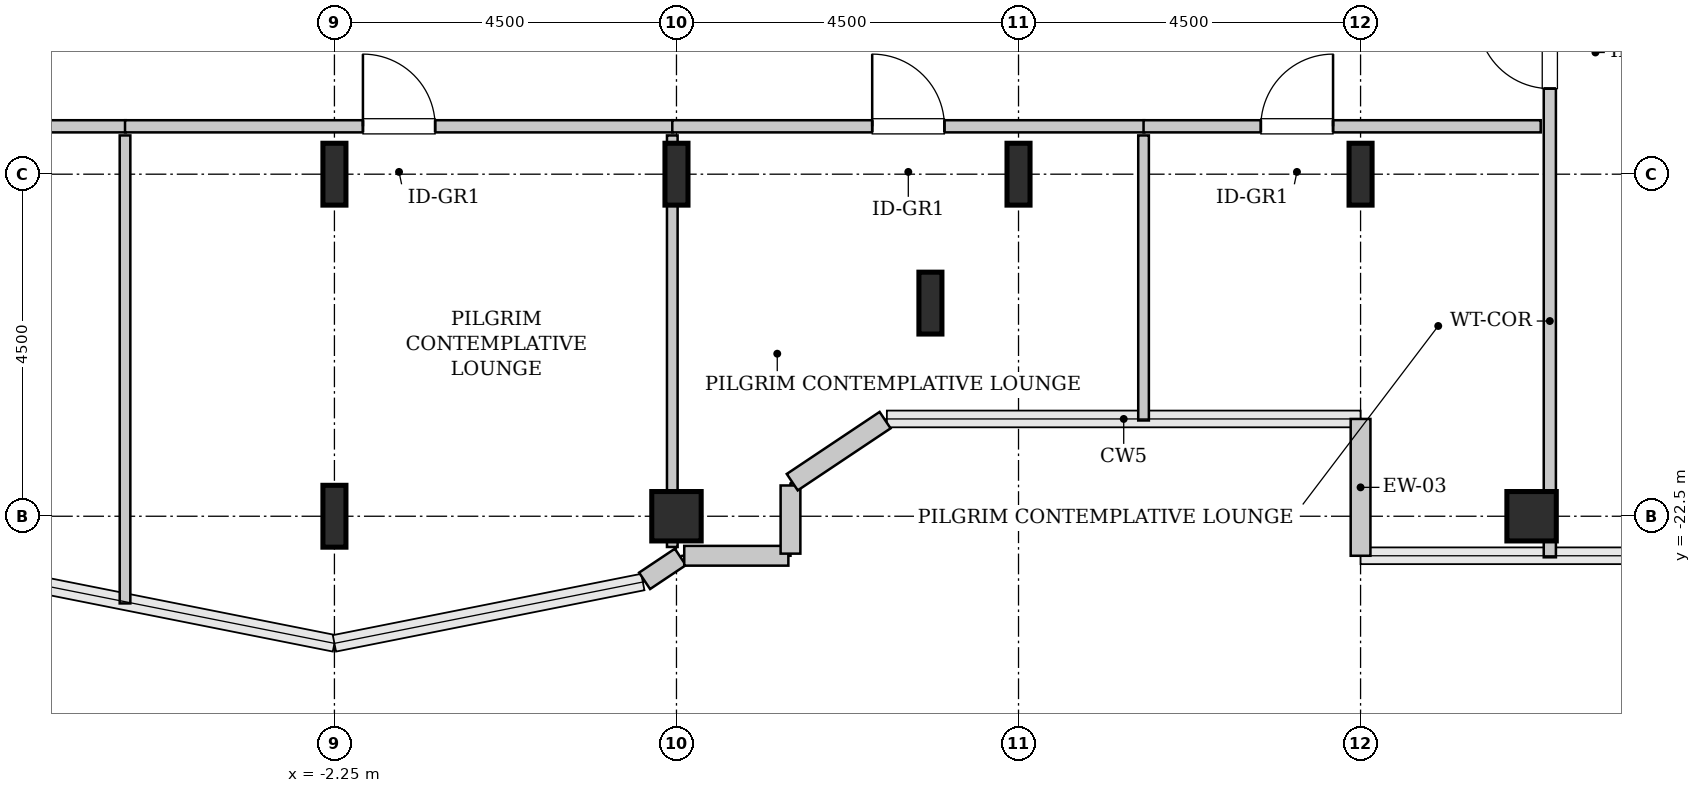
"""IFC4 building model, lengths in metres.
Left out: names, types, materials, properties, quantities, classifications, styles, units other than length and angle.
Written with IfcOpenShell. Run it as: python <this file> out.ifc"""

import sys

from ifc_helpers import new_model, si_unit, direction, frame, frame_2d, origin, origin_2d, place, context, subcontext, project, spatial, rectangle, hollow_rectangle, i_section, extrude, source, transform, mapped, element, fill, save


model = new_model("IFC4")
c1 = context("Model", 3, precision=1e-05, world=origin(), true_north=direction((0.0, 1.0)))
c2 = subcontext(c1, "Body", "Model", "MODEL_VIEW")
j1 = project(units=[si_unit("LENGTHUNIT", "METRE"), si_unit("PLANEANGLEUNIT", "RADIAN")], contexts=[c1])
p1 = place(None, origin())
s1 = spatial("IfcSite", under=j1, at=p1, CompositionType="ELEMENT")
p2 = place(p1, origin())
s2 = spatial("IfcBuilding", under=s1, at=p2, CompositionType="ELEMENT")
p3 = place(p2, frame((0.0, 0.0, 229.4)))
s3 = spatial("IfcBuildingStorey", under=s2, at=p3, CompositionType="ELEMENT", Elevation=229.4)
m1 = source(origin(), c2, "Body", "SweptSolid", [
    extrude(i_section(OverallWidth=0.303, OverallDepth=0.814, WebThickness=0.021, FlangeThickness=0.04, FilletRadius=0.03, at=origin_2d()), origin(), (0.0, 0.0, 1.0), 3.8),
])
for number, where, z_axis, x_axis in (
    (1, (-2.25, -22.5, 0.0), (0.0, 0.0, 1.0), (1.0, 0.0, 0.0)),
    (2, (-2.25, -18.0, 0.0), (0.0, 0.0, 1.0), (1.0, 0.0, 0.0)),
):
    element("IfcColumn", number, at=place(p3, frame(where, z_axis=z_axis, x_axis=x_axis)), inside=s3, PredefinedType="COLUMN", context=c2, shape_type="MappedRepresentation", body=[
        mapped(m1, transform((0.0, 0.0, 0.0), x_axis=(1.0, 0.0, 0.0), y_axis=(0.0, 1.0, 0.0), z_axis=(0.0, 0.0, 1.0), scale=1.0)),
    ])
m2 = source(origin(), c2, "Body", "SweptSolid", [
    extrude(hollow_rectangle(XDim=0.65, YDim=0.65, WallThickness=0.032, InnerFilletRadius=0.032, OuterFilletRadius=0.064, at=origin_2d()), origin(), (0.0, 0.0, 1.0), 3.8),
])
p4 = place(p3, frame((2.25, -22.5, 0.0), z_axis=(0.0, 0.0, 1.0), x_axis=(1.0, 0.0, 0.0)))
e3 = element("IfcColumn", 3, at=p4, inside=s3, PredefinedType="COLUMN", context=c2, shape_type="MappedRepresentation", body=[
    mapped(m2, transform((0.0, 0.0, 0.0), x_axis=(1.0, 0.0, 0.0), y_axis=(0.0, 1.0, 0.0), z_axis=(0.0, 0.0, 1.0), scale=1.0)),
])
for number, where, z_axis, x_axis in (
    (4, (2.25, -18.0, 0.0), (0.0, 0.0, 1.0), (1.0, 0.0, 0.0)),
    (5, (5.591, -19.696, 0.0), (0.0, 0.0, 1.0), (1.0, 0.0, 0.0)),
    (6, (6.75, -18.0, 0.0), (0.0, 0.0, 1.0), (1.0, 0.0, 0.0)),
    (7, (11.25, -18.0, 0.0), (0.0, 0.0, 1.0), (1.0, 0.0, 0.0)),
):
    element("IfcColumn", number, at=place(p3, frame(where, z_axis=z_axis, x_axis=x_axis)), inside=s3, PredefinedType="COLUMN", context=c2, shape_type="MappedRepresentation", body=[
        mapped(m1, transform((0.0, 0.0, 0.0), x_axis=(1.0, 0.0, 0.0), y_axis=(0.0, 1.0, 0.0), z_axis=(0.0, 0.0, 1.0), scale=1.0)),
    ])
p5 = place(p3, frame((13.5, -22.5, 0.0), z_axis=(0.0, 0.0, 1.0), x_axis=(1.0, 0.0, 0.0)))
e8 = element("IfcColumn", 8, at=p5, inside=s3, PredefinedType="COLUMN", context=c2, shape_type="MappedRepresentation", body=[
    mapped(m2, transform((0.0, 0.0, 0.0), x_axis=(1.0, 0.0, 0.0), y_axis=(0.0, 1.0, 0.0), z_axis=(0.0, 0.0, 1.0), scale=1.0)),
])
m3 = source(origin(), c2, "Body", "SweptSolid", [
    extrude(rectangle(XDim=1.8, YDim=0.26, at=frame_2d((0.9, 0.0))), origin(), (0.0, 0.0, 1.0), 3.55),
])
p6 = place(p3, frame((11.25, -21.22, 0.0), z_axis=(0.0, 0.0, 1.0), x_axis=(0.0, -1.0, 0.0)))
e9 = element("IfcWall", 9, at=p6, inside=s3, PredefinedType="SOLIDWALL", context=c2, shape_type="MappedRepresentation", body=[
    mapped(m3, transform((0.0, 0.0, 0.0), x_axis=(1.0, 0.0, 0.0), y_axis=(0.0, 1.0, 0.0), z_axis=(0.0, 0.0, 1.0), scale=1.0)),
])
m4 = source(origin(), c2, "Body", "SweptSolid", [
    extrude(rectangle(XDim=0.565, YDim=0.26, at=frame_2d((0.283, 0.0))), origin(), (0.0, 0.0, 1.0), 3.55),
])
p7 = place(p3, frame((1.831, -23.35, 0.0), z_axis=(0.0, 0.0, 1.0), x_axis=(0.831651492666, 0.555297933317, 0.0)))
e10 = element("IfcWall", 10, at=p7, inside=s3, PredefinedType="SOLIDWALL", context=c2, shape_type="MappedRepresentation", body=[
    mapped(m4, transform((0.0, 0.0, 0.0), x_axis=(1.0, 0.0, 0.0), y_axis=(0.0, 1.0, 0.0), z_axis=(0.0, 0.0, 1.0), scale=1.0)),
])
m5 = source(origin(), c2, "Body", "SweptSolid", [
    extrude(rectangle(XDim=1.37, YDim=0.26, at=frame_2d((0.685, 0.0))), origin(), (0.0, 0.0, 1.0), 3.55),
])
p8 = place(p3, frame((2.352, -23.02, 0.0), z_axis=(0.0, 0.0, 1.0), x_axis=(1.0, 0.0, 0.0)))
e11 = element("IfcWall", 11, at=p8, inside=s3, PredefinedType="SOLIDWALL", context=c2, shape_type="MappedRepresentation", body=[
    mapped(m5, transform((0.0, 0.0, 0.0), x_axis=(1.0, 0.0, 0.0), y_axis=(0.0, 1.0, 0.0), z_axis=(0.0, 0.0, 1.0), scale=1.0)),
])
m6 = source(origin(), c2, "Body", "SweptSolid", [
    extrude(rectangle(XDim=0.897, YDim=0.26, at=frame_2d((0.448, 0.0))), origin(), (0.0, 0.0, 1.0), 3.55),
])
p9 = place(p3, frame((3.75, -22.992, 0.0), z_axis=(0.0, 0.0, 1.0), x_axis=(0.0, 1.0, 0.0)))
e12 = element("IfcWall", 12, at=p9, inside=s3, PredefinedType="SOLIDWALL", context=c2, shape_type="MappedRepresentation", body=[
    mapped(m6, transform((0.0, 0.0, 0.0), x_axis=(1.0, 0.0, 0.0), y_axis=(0.0, 1.0, 0.0), z_axis=(0.0, 0.0, 1.0), scale=1.0)),
])
m7 = source(origin(), c2, "Body", "SweptSolid", [
    extrude(rectangle(XDim=1.469, YDim=0.26, at=frame_2d((0.734, 0.0))), origin(), (0.0, 0.0, 1.0), 3.55),
])
p10 = place(p3, frame((3.773, -22.052, 0.0), z_axis=(0.0, 0.0, 1.0), x_axis=(0.831461760506, 0.555581983884, 0.0)))
e13 = element("IfcWall", 13, at=p10, inside=s3, PredefinedType="SOLIDWALL", context=c2, shape_type="MappedRepresentation", body=[
    mapped(m7, transform((0.0, 0.0, 0.0), x_axis=(1.0, 0.0, 0.0), y_axis=(0.0, 1.0, 0.0), z_axis=(0.0, 0.0, 1.0), scale=1.0)),
])
m8 = source(origin(), c2, "Body", "SweptSolid", [
    extrude(rectangle(XDim=7.653, YDim=0.16, at=frame_2d((3.826, 0.0))), origin(), (0.0, 0.0, 1.0), 3.535),
])
p11 = place(p3, frame((13.74, -23.04, 0.0), z_axis=(0.0, 0.0, 1.0), x_axis=(0.0, 1.0, 0.0)))
e14 = element("IfcWall", 14, at=p11, inside=s3, PredefinedType="PARTITIONING", context=c2, shape_type="MappedRepresentation", body=[
    mapped(m8, transform((0.0, 0.0, 0.0), x_axis=(1.0, 0.0, 0.0), y_axis=(0.0, 1.0, 0.0), z_axis=(0.0, 0.0, 1.0), scale=1.0)),
])
p12 = place(p11, frame((6.166, 0.0, 0.0)))
e15 = element("IfcOpeningElement", 15, at=p12, cuts=e14, PredefinedType="OPENING", context=c2, shape_type="SweptSolid", body=[
    extrude(rectangle(XDim=0.95, YDim=2.1, at=frame_2d((0.475, 1.05))), frame((0.0, 0.09, 0.0), z_axis=(0.0, -1.0, 0.0), x_axis=(1.0, 0.0, 0.0)), (0.0, 0.0, 1.0), 0.18),
])
m9 = source(origin(), c2, "Body", "SweptSolid", [
    extrude(rectangle(XDim=4.61, YDim=0.16, at=frame_2d((2.305, 0.0))), origin(), (0.0, 0.0, 1.0), 3.535),
])
p13 = place(p3, frame((-9.605, -17.37, 0.0), z_axis=(0.0, 0.0, 1.0), x_axis=(1.0, 0.0, 0.0)))
e16 = element("IfcWall", 16, at=p13, inside=s3, PredefinedType="PARTITIONING", context=c2, shape_type="MappedRepresentation", body=[
    mapped(m9, transform((0.0, 0.0, 0.0), x_axis=(1.0, 0.0, 0.0), y_axis=(0.0, 1.0, 0.0), z_axis=(0.0, 0.0, 1.0), scale=1.0)),
])
p14 = place(p13, frame((1.582, 0.0, 0.0)))
e17 = element("IfcOpeningElement", 17, at=p14, cuts=e16, PredefinedType="OPENING", context=c2, shape_type="SweptSolid", body=[
    extrude(rectangle(XDim=0.95, YDim=2.1, at=frame_2d((0.475, 1.05))), frame((0.0, 0.09, 0.0), z_axis=(0.0, -1.0, 0.0), x_axis=(1.0, 0.0, 0.0)), (0.0, 0.0, 1.0), 0.18),
])
m10 = source(origin(), c2, "Body", "SweptSolid", [
    extrude(rectangle(XDim=6.157, YDim=0.14, at=frame_2d((3.078, 0.0))), origin(), (0.0, 0.0, 1.0), 3.535),
])
p15 = place(p3, frame((-5.005, -23.647, 0.0), z_axis=(0.0, 0.0, 1.0), x_axis=(0.0, 1.0, 0.0)))
e18 = element("IfcWall", 18, at=p15, inside=s3, PredefinedType="PARTITIONING", context=c2, shape_type="MappedRepresentation", body=[
    mapped(m10, transform((0.0, 0.0, 0.0), x_axis=(1.0, 0.0, 0.0), y_axis=(0.0, 1.0, 0.0), z_axis=(0.0, 0.0, 1.0), scale=1.0)),
])
m11 = source(origin(), c2, "Body", "SweptSolid", [
    extrude(rectangle(XDim=7.21, YDim=0.16, at=frame_2d((3.605, 0.0))), origin(), (0.0, 0.0, 1.0), 3.535),
])
p16 = place(p3, frame((-5.005, -17.37, 0.0), z_axis=(0.0, 0.0, 1.0), x_axis=(1.0, 0.0, 0.0)))
e19 = element("IfcWall", 19, at=p16, inside=s3, PredefinedType="PARTITIONING", context=c2, shape_type="MappedRepresentation", body=[
    mapped(m11, transform((0.0, 0.0, 0.0), x_axis=(1.0, 0.0, 0.0), y_axis=(0.0, 1.0, 0.0), z_axis=(0.0, 0.0, 1.0), scale=1.0)),
])
p17 = place(p16, frame((3.13, 0.0, 0.0)))
e20 = element("IfcOpeningElement", 20, at=p17, cuts=e19, PredefinedType="OPENING", context=c2, shape_type="SweptSolid", body=[
    extrude(rectangle(XDim=0.95, YDim=2.1, at=frame_2d((0.475, 1.05))), frame((0.0, 0.09, 0.0), z_axis=(0.0, -1.0, 0.0), x_axis=(1.0, 0.0, 0.0)), (0.0, 0.0, 1.0), 0.18),
])
m12 = source(origin(), c2, "Body", "SweptSolid", [
    extrude(rectangle(XDim=5.414, YDim=0.14, at=frame_2d((2.707, 0.0))), origin(), (0.0, 0.0, 1.0), 2.925),
])
p18 = place(p3, frame((2.195, -22.904, 0.0), z_axis=(0.0, 0.0, 1.0), x_axis=(0.0, 1.0, 0.0)))
e21 = element("IfcWall", 21, at=p18, inside=s3, PredefinedType="PARTITIONING", context=c2, shape_type="MappedRepresentation", body=[
    mapped(m12, transform((0.0, 0.0, 0.0), x_axis=(1.0, 0.0, 0.0), y_axis=(0.0, 1.0, 0.0), z_axis=(0.0, 0.0, 1.0), scale=1.0)),
])
m13 = source(origin(), c2, "Body", "SweptSolid", [
    extrude(rectangle(XDim=6.21, YDim=0.16, at=frame_2d((3.105, 0.0))), origin(), (0.0, 0.0, 1.0), 3.535),
])
p19 = place(p3, frame((2.195, -17.37, 0.0), z_axis=(0.0, 0.0, 1.0), x_axis=(1.0, 0.0, 0.0)))
e22 = element("IfcWall", 22, at=p19, inside=s3, PredefinedType="PARTITIONING", context=c2, shape_type="MappedRepresentation", body=[
    mapped(m13, transform((0.0, 0.0, 0.0), x_axis=(1.0, 0.0, 0.0), y_axis=(0.0, 1.0, 0.0), z_axis=(0.0, 0.0, 1.0), scale=1.0)),
])
p20 = place(p19, frame((2.63, 0.0, 0.0)))
e23 = element("IfcOpeningElement", 23, at=p20, cuts=e22, PredefinedType="OPENING", context=c2, shape_type="SweptSolid", body=[
    extrude(rectangle(XDim=0.95, YDim=2.1, at=frame_2d((0.475, 1.05))), frame((0.0, 0.09, 0.0), z_axis=(0.0, -1.0, 0.0), x_axis=(1.0, 0.0, 0.0)), (0.0, 0.0, 1.0), 0.18),
])
m14 = source(origin(), c2, "Body", "SweptSolid", [
    extrude(rectangle(XDim=3.75, YDim=0.14, at=frame_2d((1.875, 0.0))), origin(), (0.0, 0.0, 1.0), 3.535),
])
p21 = place(p3, frame((8.395, -21.24, 0.0), z_axis=(0.0, 0.0, 1.0), x_axis=(0.0, 1.0, 0.0)))
e24 = element("IfcWall", 24, at=p21, inside=s3, PredefinedType="PARTITIONING", context=c2, shape_type="MappedRepresentation", body=[
    mapped(m14, transform((0.0, 0.0, 0.0), x_axis=(1.0, 0.0, 0.0), y_axis=(0.0, 1.0, 0.0), z_axis=(0.0, 0.0, 1.0), scale=1.0)),
])
m15 = source(origin(), c2, "Body", "SweptSolid", [
    extrude(rectangle(XDim=5.225, YDim=0.16, at=frame_2d((2.613, 0.0))), origin(), (0.0, 0.0, 1.0), 3.535),
])
p22 = place(p3, frame((8.395, -17.37, 0.0), z_axis=(0.0, 0.0, 1.0), x_axis=(1.0, 0.0, 0.0)))
e25 = element("IfcWall", 25, at=p22, inside=s3, PredefinedType="PARTITIONING", context=c2, shape_type="MappedRepresentation", body=[
    mapped(m15, transform((0.0, 0.0, 0.0), x_axis=(1.0, 0.0, 0.0), y_axis=(0.0, 1.0, 0.0), z_axis=(0.0, 0.0, 1.0), scale=1.0)),
])
p23 = place(p22, frame((1.543, 0.0, 0.0)))
e26 = element("IfcOpeningElement", 26, at=p23, cuts=e25, PredefinedType="OPENING", context=c2, shape_type="SweptSolid", body=[
    extrude(rectangle(XDim=0.95, YDim=2.1, at=frame_2d((0.475, 1.05))), frame((0.0, 0.09, 0.0), z_axis=(0.0, -1.0, 0.0), x_axis=(1.0, 0.0, 0.0)), (0.0, 0.0, 1.0), 0.18),
])
m16 = source(origin(), c2, "Body", "SweptSolid", [
    extrude(rectangle(XDim=0.95, YDim=2.1, at=frame_2d((0.475, 1.05))), frame((0.0, 0.025, 0.0), z_axis=(0.0, -1.0, 0.0), x_axis=(1.0, 0.0, 0.0)), (0.0, 0.0, 1.0), 0.05),
])
p24 = place(p12, origin())
e27 = element("IfcDoor", 27, at=p24, inside=s3, OperationType="SINGLE_SWING_RIGHT", PredefinedType="DOOR", context=c2, shape_type="MappedRepresentation", body=[
    mapped(m16, transform((0.0, 0.0, 0.0), x_axis=(1.0, 0.0, 0.0), y_axis=(0.0, 1.0, 0.0), z_axis=(0.0, 0.0, 1.0), scale=1.0)),
])
fill(e15, e27)
p25 = place(p17, origin())
e28 = element("IfcDoor", 28, at=p25, inside=s3, OperationType="SINGLE_SWING_LEFT", PredefinedType="DOOR", context=c2, shape_type="MappedRepresentation", body=[
    mapped(m16, transform((0.0, 0.0, 0.0), x_axis=(1.0, 0.0, 0.0), y_axis=(0.0, 1.0, 0.0), z_axis=(0.0, 0.0, 1.0), scale=1.0)),
])
fill(e20, e28)
p26 = place(p20, origin())
e29 = element("IfcDoor", 29, at=p26, inside=s3, OperationType="SINGLE_SWING_LEFT", PredefinedType="DOOR", context=c2, shape_type="MappedRepresentation", body=[
    mapped(m16, transform((0.0, 0.0, 0.0), x_axis=(1.0, 0.0, 0.0), y_axis=(0.0, 1.0, 0.0), z_axis=(0.0, 0.0, 1.0), scale=1.0)),
])
fill(e23, e29)
p27 = place(p23, origin())
e30 = element("IfcDoor", 30, at=p27, inside=s3, OperationType="SINGLE_SWING_RIGHT", PredefinedType="DOOR", context=c2, shape_type="MappedRepresentation", body=[
    mapped(m16, transform((0.0, 0.0, 0.0), x_axis=(1.0, 0.0, 0.0), y_axis=(0.0, 1.0, 0.0), z_axis=(0.0, 0.0, 1.0), scale=1.0)),
])
fill(e26, e30)
save(model, sys.argv[1])
